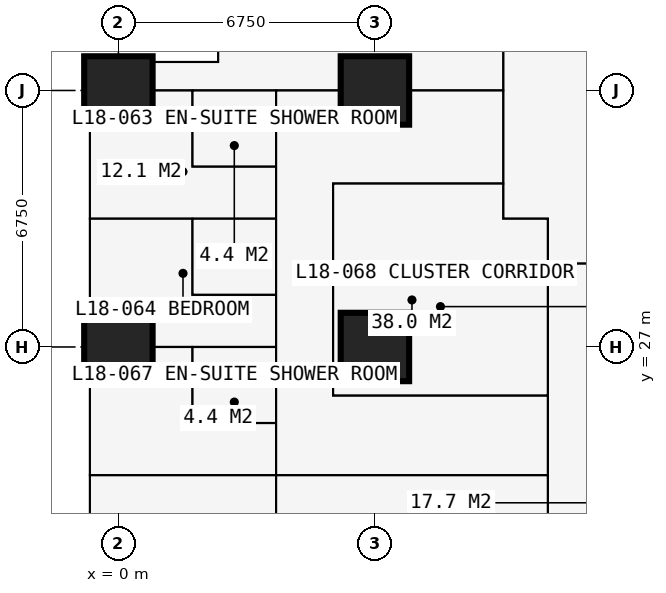
"""IFC4 building model, lengths in metres.
Left out: names, types, materials, properties, quantities, classifications, styles, units other than length and angle.
Written with IfcOpenShell. Run it as: python <this file> out.ifc"""

import sys

from ifc_helpers import new_model, si_unit, direction, frame, frame_2d, origin, origin_2d, place, context, subcontext, project, spatial, rectangle, extrude, element, fill, save


model = new_model("IFC4")
c1 = context("Model", 3, precision=1e-05, world=origin(), true_north=direction((0.0, 1.0)))
c2 = subcontext(c1, "Body", "Model", "MODEL_VIEW")
j1 = project(units=[si_unit("LENGTHUNIT", "METRE"), si_unit("PLANEANGLEUNIT", "RADIAN")], contexts=[c1])
p1 = place(None, origin())
s1 = spatial("IfcSite", under=j1, at=p1, CompositionType="ELEMENT")
p2 = place(p1, origin())
s2 = spatial("IfcBuilding", under=s1, at=p2, CompositionType="ELEMENT")
p3 = place(p2, frame((0.0, 0.0, 68.4)))
s3 = spatial("IfcBuildingStorey", under=s2, at=p3, CompositionType="ELEMENT", Elevation=68.4)
for number, where, z_axis, x_axis in (
    (1, (0.0, 27.0, 0.0), (0.0, 0.0, 1.0), (1.0, 0.0, 0.0)),
    (2, (0.0, 33.75, 0.0), (0.0, 0.0, 1.0), (1.0, 0.0, 0.0)),
    (3, (6.75, 27.0, 0.0), (0.0, 0.0, 1.0), (1.0, 0.0, 0.0)),
    (4, (6.75, 33.75, 0.0), (0.0, 0.0, 1.0), (1.0, 0.0, 0.0)),
):
    element("IfcColumn", number, at=place(p3, frame(where, z_axis=z_axis, x_axis=x_axis)), inside=s3, PredefinedType="COLUMN", context=c2, shape_type="SweptSolid", body=[
        extrude(rectangle(XDim=1.8, YDim=1.8, at=origin_2d()), origin(), (0.0, 0.0, 1.0), 3.6),
    ])
p4 = place(p3, frame((2.625, 37.875, 0.0), z_axis=(0.0, 0.0, 1.0), x_axis=(0.0, -1.0, 0.0)))
e5 = element("IfcWall", 5, at=p4, inside=s3, PredefinedType="SOLIDWALL", context=c2, shape_type="SweptSolid", body=[
    extrude(rectangle(XDim=3.375, YDim=0.3, at=frame_2d((1.688, 0.0))), origin(), (0.0, 0.0, 1.0), 3.375),
])
p5 = place(p4, frame((0.788, 0.0, 0.6)))
e6 = element("IfcOpeningElement", 6, at=p5, cuts=e5, PredefinedType="OPENING", context=c2, shape_type="SweptSolid", body=[
    extrude(rectangle(XDim=1.8, YDim=2.1, at=frame_2d((0.9, 1.05))), frame((0.0, 0.16, 0.0), z_axis=(0.0, -1.0, 0.0), x_axis=(1.0, 0.0, 0.0)), (0.0, 0.0, 1.0), 0.32),
])
p6 = place(p3, frame((2.625, 34.5, 0.0), z_axis=(0.0, 0.0, 1.0), x_axis=(-1.0, 0.0, 0.0)))
e7 = element("IfcWall", 7, at=p6, inside=s3, PredefinedType="SOLIDWALL", context=c2, shape_type="SweptSolid", body=[
    extrude(rectangle(XDim=3.375, YDim=0.3, at=frame_2d((1.688, 0.0))), origin(), (0.0, 0.0, 1.0), 3.375),
])
p7 = place(p6, frame((0.343, 0.0, 0.9)))
e8 = element("IfcOpeningElement", 8, at=p7, cuts=e7, PredefinedType="OPENING", context=c2, shape_type="SweptSolid", body=[
    extrude(rectangle(XDim=1.2, YDim=1.8, at=frame_2d((0.6, 0.9))), frame((0.0, 0.16, 0.0), z_axis=(0.0, -1.0, 0.0), x_axis=(1.0, 0.0, 0.0)), (0.0, 0.0, 1.0), 0.32),
])
p8 = place(p3, frame((-0.734, 23.625, 0.0), z_axis=(0.0, 0.0, 1.0), x_axis=(1.0, 0.0, 0.0)))
e9 = element("IfcWall", 9, at=p8, inside=s3, PredefinedType="PARTITIONING", context=c2, shape_type="SweptSolid", body=[
    extrude(rectangle(XDim=12.034, YDim=0.15, at=frame_2d((6.017, 0.0))), origin(), (0.0, 0.0, 1.0), 3.375),
])
p9 = place(p3, frame((-0.734, 27.0, 0.0), z_axis=(0.0, 0.0, 1.0), x_axis=(1.0, 0.0, 0.0)))
e10 = element("IfcWall", 10, at=p9, inside=s3, PredefinedType="PARTITIONING", context=c2, shape_type="SweptSolid", body=[
    extrude(rectangle(XDim=4.884, YDim=0.175, at=frame_2d((2.442, 0.0))), origin(), (0.0, 0.0, 1.0), 2.61),
])
p10 = place(p9, frame((3.334, 0.0, 0.0)))
e11 = element("IfcOpeningElement", 11, at=p10, cuts=e10, PredefinedType="OPENING", context=c2, shape_type="SweptSolid", body=[
    extrude(rectangle(XDim=0.9, YDim=2.2, at=frame_2d((0.45, 1.1))), frame((0.0, 0.097, 0.0), z_axis=(0.0, -1.0, 0.0), x_axis=(1.0, 0.0, 0.0)), (0.0, 0.0, 1.0), 0.195),
])
p11 = place(p3, frame((-0.734, 30.375, 0.0), z_axis=(0.0, 0.0, 1.0), x_axis=(1.0, 0.0, 0.0)))
e12 = element("IfcWall", 12, at=p11, inside=s3, PredefinedType="PARTITIONING", context=c2, shape_type="SweptSolid", body=[
    extrude(rectangle(XDim=4.884, YDim=0.175, at=frame_2d((2.442, 0.0))), origin(), (0.0, 0.0, 1.0), 3.375),
])
p12 = place(p11, frame((3.334, 0.0, 0.0)))
e13 = element("IfcOpeningElement", 13, at=p12, cuts=e12, PredefinedType="OPENING", context=c2, shape_type="SweptSolid", body=[
    extrude(rectangle(XDim=0.9, YDim=2.2, at=frame_2d((0.45, 1.1))), frame((0.0, 0.097, 0.0), z_axis=(0.0, -1.0, 0.0), x_axis=(1.0, 0.0, 0.0)), (0.0, 0.0, 1.0), 0.195),
])
p13 = place(p3, frame((-0.734, 33.75, 0.0), z_axis=(0.0, 0.0, 1.0), x_axis=(1.0, 0.0, 0.0)))
e14 = element("IfcWall", 14, at=p13, inside=s3, PredefinedType="PARTITIONING", context=c2, shape_type="SweptSolid", body=[
    extrude(rectangle(XDim=10.859, YDim=0.15, at=frame_2d((5.429, 0.0))), origin(), (0.0, 0.0, 1.0), 2.877),
])
p14 = place(p13, frame((8.434, 0.0, 0.0)))
e15 = element("IfcOpeningElement", 15, at=p14, cuts=e14, PredefinedType="OPENING", context=c2, shape_type="SweptSolid", body=[
    extrude(rectangle(XDim=1.0, YDim=2.2, at=frame_2d((0.5, 1.1))), frame((0.0, 0.085, 0.0), z_axis=(0.0, -1.0, 0.0), x_axis=(1.0, 0.0, 0.0)), (0.0, 0.0, 1.0), 0.17),
])
p15 = place(p3, frame((1.95, 25.0, 0.0), z_axis=(0.0, 0.0, 1.0), x_axis=(0.0, 1.0, 0.0)))
e16 = element("IfcWall", 16, at=p15, inside=s3, PredefinedType="PARTITIONING", context=c2, shape_type="SweptSolid", body=[
    extrude(rectangle(XDim=2.0, YDim=0.1, at=frame_2d((1.0, 0.0))), origin(), (0.0, 0.0, 1.0), 3.375),
])
p16 = place(p3, frame((1.95, 25.0, 0.0), z_axis=(0.0, 0.0, 1.0), x_axis=(1.0, 0.0, 0.0)))
e17 = element("IfcWall", 17, at=p16, inside=s3, PredefinedType="PARTITIONING", context=c2, shape_type="SweptSolid", body=[
    extrude(rectangle(XDim=2.2, YDim=0.1, at=frame_2d((1.1, 0.0))), origin(), (0.0, 0.0, 1.0), 3.375),
])
p17 = place(p3, frame((1.95, 28.375, 0.0), z_axis=(0.0, 0.0, 1.0), x_axis=(0.0, 1.0, 0.0)))
e18 = element("IfcWall", 18, at=p17, inside=s3, PredefinedType="PARTITIONING", context=c2, shape_type="SweptSolid", body=[
    extrude(rectangle(XDim=2.0, YDim=0.1, at=frame_2d((1.0, 0.0))), origin(), (0.0, 0.0, 1.0), 3.375),
])
p18 = place(p3, frame((1.95, 28.375, 0.0), z_axis=(0.0, 0.0, 1.0), x_axis=(1.0, 0.0, 0.0)))
e19 = element("IfcWall", 19, at=p18, inside=s3, PredefinedType="PARTITIONING", context=c2, shape_type="SweptSolid", body=[
    extrude(rectangle(XDim=2.2, YDim=0.1, at=frame_2d((1.1, 0.0))), origin(), (0.0, 0.0, 1.0), 3.375),
])
p19 = place(p3, frame((1.95, 31.75, 0.0), z_axis=(0.0, 0.0, 1.0), x_axis=(0.0, 1.0, 0.0)))
e20 = element("IfcWall", 20, at=p19, inside=s3, PredefinedType="PARTITIONING", context=c2, shape_type="SweptSolid", body=[
    extrude(rectangle(XDim=2.0, YDim=0.1, at=frame_2d((1.0, 0.0))), origin(), (0.0, 0.0, 1.0), 3.375),
])
p20 = place(p3, frame((1.95, 31.75, 0.0), z_axis=(0.0, 0.0, 1.0), x_axis=(1.0, 0.0, 0.0)))
e21 = element("IfcWall", 21, at=p20, inside=s3, PredefinedType="PARTITIONING", context=c2, shape_type="SweptSolid", body=[
    extrude(rectangle(XDim=2.2, YDim=0.1, at=frame_2d((1.1, 0.0))), origin(), (0.0, 0.0, 1.0), 3.375),
])
p21 = place(p20, frame((0.65, 0.0, 0.0)))
e22 = element("IfcOpeningElement", 22, at=p21, cuts=e21, PredefinedType="OPENING", context=c2, shape_type="SweptSolid", body=[
    extrude(rectangle(XDim=0.9, YDim=2.2, at=frame_2d((0.45, 1.1))), frame((0.0, 0.06, 0.0), z_axis=(0.0, -1.0, 0.0), x_axis=(1.0, 0.0, 0.0)), (0.0, 0.0, 1.0), 0.12),
])
p22 = place(p3, frame((4.15, 10.125, 0.0), z_axis=(0.0, 0.0, 1.0), x_axis=(0.0, 1.0, 0.0)))
e23 = element("IfcWall", 23, at=p22, inside=s3, PredefinedType="PARTITIONING", context=c2, shape_type="SweptSolid", body=[
    extrude(rectangle(XDim=23.625, YDim=0.15, at=frame_2d((11.812, 0.0))), origin(), (0.0, 0.0, 1.0), 3.375),
])
p23 = place(p22, frame((20.5, 0.0, 0.0)))
e24 = element("IfcOpeningElement", 24, at=p23, cuts=e23, PredefinedType="OPENING", context=c2, shape_type="SweptSolid", body=[
    extrude(rectangle(XDim=0.95, YDim=2.2, at=frame_2d((0.475, 1.1))), frame((0.0, 0.085, 0.0), z_axis=(0.0, -1.0, 0.0), x_axis=(1.0, 0.0, 0.0)), (0.0, 0.0, 1.0), 0.17),
])
p24 = place(p22, frame((17.125, 0.0, 0.0)))
e25 = element("IfcOpeningElement", 25, at=p24, cuts=e23, PredefinedType="OPENING", context=c2, shape_type="SweptSolid", body=[
    extrude(rectangle(XDim=0.95, YDim=2.2, at=frame_2d((0.475, 1.1))), frame((0.0, 0.085, 0.0), z_axis=(0.0, -1.0, 0.0), x_axis=(1.0, 0.0, 0.0)), (0.0, 0.0, 1.0), 0.17),
])
p25 = place(p22, frame((13.7, 0.0, 0.0)))
e26 = element("IfcOpeningElement", 26, at=p25, cuts=e23, PredefinedType="OPENING", context=c2, shape_type="SweptSolid", body=[
    extrude(rectangle(XDim=0.95, YDim=2.2, at=frame_2d((0.475, 1.1))), frame((0.0, 0.085, 0.0), z_axis=(0.0, -1.0, 0.0), x_axis=(1.0, 0.0, 0.0)), (0.0, 0.0, 1.0), 0.17),
])
p26 = place(p22, frame((4.2, 0.0, 0.0)))
e27 = element("IfcOpeningElement", 27, at=p26, cuts=e23, PredefinedType="OPENING", context=c2, shape_type="SweptSolid", body=[
    extrude(rectangle(XDim=0.95, YDim=2.2, at=frame_2d((0.475, 1.1))), frame((0.0, 0.085, 0.0), z_axis=(0.0, -1.0, 0.0), x_axis=(1.0, 0.0, 0.0)), (0.0, 0.0, 1.0), 0.17),
])
p27 = place(p22, frame((10.95, 0.0, 0.0)))
e28 = element("IfcOpeningElement", 28, at=p27, cuts=e23, PredefinedType="OPENING", context=c2, shape_type="SweptSolid", body=[
    extrude(rectangle(XDim=0.95, YDim=2.2, at=frame_2d((0.475, 1.1))), frame((0.0, 0.085, 0.0), z_axis=(0.0, -1.0, 0.0), x_axis=(1.0, 0.0, 0.0)), (0.0, 0.0, 1.0), 0.17),
])
p28 = place(p3, frame((5.65, 25.725, 0.0), z_axis=(0.0, 0.0, 1.0), x_axis=(0.0, 1.0, 0.0)))
e29 = element("IfcWall", 29, at=p28, inside=s3, PredefinedType="PARTITIONING", context=c2, shape_type="SweptSolid", body=[
    extrude(rectangle(XDim=5.575, YDim=0.15, at=frame_2d((2.788, 0.0))), origin(), (0.0, 0.0, 1.0), 3.375),
])
p29 = place(p3, frame((5.65, 25.725, 0.0), z_axis=(0.0, 0.0, 1.0), x_axis=(1.0, 0.0, 0.0)))
e30 = element("IfcWall", 30, at=p29, inside=s3, PredefinedType="PARTITIONING", context=c2, shape_type="SweptSolid", body=[
    extrude(rectangle(XDim=5.65, YDim=0.15, at=frame_2d((2.825, 0.0))), origin(), (0.0, 0.0, 1.0), 3.375),
])
p30 = place(p3, frame((5.65, 31.3, 0.0), z_axis=(0.0, 0.0, 1.0), x_axis=(1.0, 0.0, 0.0)))
e31 = element("IfcWall", 31, at=p30, inside=s3, PredefinedType="PARTITIONING", context=c2, shape_type="SweptSolid", body=[
    extrude(rectangle(XDim=4.475, YDim=0.15, at=frame_2d((2.238, 0.0))), origin(), (0.0, 0.0, 1.0), 3.375),
])
p31 = place(p3, frame((10.125, 30.375, 0.0), z_axis=(0.0, 0.0, 1.0), x_axis=(0.0, 1.0, 0.0)))
e32 = element("IfcWall", 32, at=p31, inside=s3, PredefinedType="PARTITIONING", context=c2, shape_type="SweptSolid", body=[
    extrude(rectangle(XDim=10.859, YDim=0.15, at=frame_2d((5.429, 0.0))), origin(), (0.0, 0.0, 1.0), 3.375),
])
p32 = place(p3, frame((10.125, 30.375, 0.0), z_axis=(0.0, 0.0, 1.0), x_axis=(1.0, 0.0, 0.0)))
e33 = element("IfcWall", 33, at=p32, inside=s3, PredefinedType="PARTITIONING", context=c2, shape_type="SweptSolid", body=[
    extrude(rectangle(XDim=1.175, YDim=0.15, at=frame_2d((0.587, 0.0))), origin(), (0.0, 0.0, 1.0), 3.375),
])
p33 = place(p3, frame((11.3, 11.3, 0.0), z_axis=(0.0, 0.0, 1.0), x_axis=(0.0, 1.0, 0.0)))
e34 = element("IfcWall", 34, at=p33, inside=s3, PredefinedType="PARTITIONING", context=c2, shape_type="SweptSolid", body=[
    extrude(rectangle(XDim=19.075, YDim=0.15, at=frame_2d((9.538, 0.0))), origin(), (0.0, 0.0, 1.0), 3.375),
])
p34 = place(p33, frame((12.875, 0.0, 0.0)))
e35 = element("IfcOpeningElement", 35, at=p34, cuts=e34, PredefinedType="OPENING", context=c2, shape_type="SweptSolid", body=[
    extrude(rectangle(XDim=1.0, YDim=2.2, at=frame_2d((0.5, 1.1))), frame((0.0, 0.085, 0.0), z_axis=(0.0, -1.0, 0.0), x_axis=(1.0, 0.0, 0.0)), (0.0, 0.0, 1.0), 0.17),
])
p35 = place(p33, frame((10.438, 0.0, 0.0)))
e36 = element("IfcOpeningElement", 36, at=p35, cuts=e34, PredefinedType="OPENING", context=c2, shape_type="SweptSolid", body=[
    extrude(rectangle(XDim=1.0, YDim=2.2, at=frame_2d((0.5, 1.1))), frame((0.0, 0.085, 0.0), z_axis=(0.0, -1.0, 0.0), x_axis=(1.0, 0.0, 0.0)), (0.0, 0.0, 1.0), 0.17),
])
p36 = place(p33, frame((15.675, 0.0, 0.0)))
e37 = element("IfcOpeningElement", 37, at=p36, cuts=e34, PredefinedType="OPENING", context=c2, shape_type="SweptSolid", body=[
    extrude(rectangle(XDim=0.95, YDim=2.2, at=frame_2d((0.475, 1.1))), frame((0.0, 0.085, 0.0), z_axis=(0.0, -1.0, 0.0), x_axis=(1.0, 0.0, 0.0)), (0.0, 0.0, 1.0), 0.17),
])
p37 = place(p3, frame((11.3, 29.2, 0.0), z_axis=(0.0, 0.0, 1.0), x_axis=(1.0, 0.0, 0.0)))
e38 = element("IfcWall", 38, at=p37, inside=s3, PredefinedType="PARTITIONING", context=c2, shape_type="SweptSolid", body=[
    extrude(rectangle(XDim=19.075, YDim=0.15, at=frame_2d((9.538, 0.0))), origin(), (0.0, 0.0, 1.0), 3.375),
])
p38 = place(p37, frame((12.875, 0.0, 0.0)))
e39 = element("IfcOpeningElement", 39, at=p38, cuts=e38, PredefinedType="OPENING", context=c2, shape_type="SweptSolid", body=[
    extrude(rectangle(XDim=1.0, YDim=2.2, at=frame_2d((0.5, 1.1))), frame((0.0, 0.085, 0.0), z_axis=(0.0, -1.0, 0.0), x_axis=(1.0, 0.0, 0.0)), (0.0, 0.0, 1.0), 0.17),
])
p39 = place(p37, frame((10.438, 0.0, 0.0)))
e40 = element("IfcOpeningElement", 40, at=p39, cuts=e38, PredefinedType="OPENING", context=c2, shape_type="SweptSolid", body=[
    extrude(rectangle(XDim=1.0, YDim=2.2, at=frame_2d((0.5, 1.1))), frame((0.0, 0.085, 0.0), z_axis=(0.0, -1.0, 0.0), x_axis=(1.0, 0.0, 0.0)), (0.0, 0.0, 1.0), 0.17),
])
p40 = place(p37, frame((14.875, 0.0, 0.0)))
e41 = element("IfcOpeningElement", 41, at=p40, cuts=e38, PredefinedType="OPENING", context=c2, shape_type="SweptSolid", body=[
    extrude(rectangle(XDim=0.95, YDim=2.2, at=frame_2d((0.475, 1.1))), frame((0.0, 0.085, 0.0), z_axis=(0.0, -1.0, 0.0), x_axis=(1.0, 0.0, 0.0)), (0.0, 0.0, 1.0), 0.17),
])
p41 = place(p7, origin())
e42 = element("IfcWindow", 42, at=p41, inside=s3, PartitioningType="SINGLE_PANEL", PredefinedType="WINDOW", context=c2, shape_type="SweptSolid", body=[
    extrude(rectangle(XDim=1.2, YDim=1.8, at=frame_2d((0.6, 0.9))), frame((0.0, 0.03, 0.0), z_axis=(0.0, -1.0, 0.0), x_axis=(1.0, 0.0, 0.0)), (0.0, 0.0, 1.0), 0.06),
])
fill(e8, e42)
p42 = place(p14, origin())
e43 = element("IfcDoor", 43, at=p42, inside=s3, OperationType="SINGLE_SWING_LEFT", PredefinedType="DOOR", context=c2, shape_type="SweptSolid", body=[
    extrude(rectangle(XDim=1.0, YDim=2.2, at=frame_2d((0.5, 1.1))), frame((0.0, 0.025, 0.0), z_axis=(0.0, -1.0, 0.0), x_axis=(1.0, 0.0, 0.0)), (0.0, 0.0, 1.0), 0.05),
])
fill(e15, e43)
p43 = place(p23, origin())
e44 = element("IfcDoor", 44, at=p43, inside=s3, OperationType="SINGLE_SWING_LEFT", PredefinedType="DOOR", context=c2, shape_type="SweptSolid", body=[
    extrude(rectangle(XDim=0.95, YDim=2.2, at=frame_2d((0.475, 1.1))), frame((0.0, 0.025, 0.0), z_axis=(0.0, -1.0, 0.0), x_axis=(1.0, 0.0, 0.0)), (0.0, 0.0, 1.0), 0.05),
])
fill(e24, e44)
p44 = place(p21, origin())
e45 = element("IfcDoor", 45, at=p44, inside=s3, OperationType="SINGLE_SWING_RIGHT", PredefinedType="DOOR", context=c2, shape_type="SweptSolid", body=[
    extrude(rectangle(XDim=0.9, YDim=2.2, at=frame_2d((0.45, 1.1))), frame((0.0, 0.025, 0.0), z_axis=(0.0, -1.0, 0.0), x_axis=(1.0, 0.0, 0.0)), (0.0, 0.0, 1.0), 0.05),
])
fill(e22, e45)
p45 = place(p24, origin())
e46 = element("IfcDoor", 46, at=p45, inside=s3, OperationType="SINGLE_SWING_LEFT", PredefinedType="DOOR", context=c2, shape_type="SweptSolid", body=[
    extrude(rectangle(XDim=0.95, YDim=2.2, at=frame_2d((0.475, 1.1))), frame((0.0, 0.025, 0.0), z_axis=(0.0, -1.0, 0.0), x_axis=(1.0, 0.0, 0.0)), (0.0, 0.0, 1.0), 0.05),
])
fill(e25, e46)
p46 = place(p12, origin())
e47 = element("IfcDoor", 47, at=p46, inside=s3, OperationType="SINGLE_SWING_RIGHT", PredefinedType="DOOR", context=c2, shape_type="SweptSolid", body=[
    extrude(rectangle(XDim=0.9, YDim=2.2, at=frame_2d((0.45, 1.1))), frame((0.0, 0.025, 0.0), z_axis=(0.0, -1.0, 0.0), x_axis=(1.0, 0.0, 0.0)), (0.0, 0.0, 1.0), 0.05),
])
fill(e13, e47)
p47 = place(p25, origin())
e48 = element("IfcDoor", 48, at=p47, inside=s3, OperationType="SINGLE_SWING_LEFT", PredefinedType="DOOR", context=c2, shape_type="SweptSolid", body=[
    extrude(rectangle(XDim=0.95, YDim=2.2, at=frame_2d((0.475, 1.1))), frame((0.0, 0.025, 0.0), z_axis=(0.0, -1.0, 0.0), x_axis=(1.0, 0.0, 0.0)), (0.0, 0.0, 1.0), 0.05),
])
fill(e26, e48)
p48 = place(p10, origin())
e49 = element("IfcDoor", 49, at=p48, inside=s3, OperationType="SINGLE_SWING_RIGHT", PredefinedType="DOOR", context=c2, shape_type="SweptSolid", body=[
    extrude(rectangle(XDim=0.9, YDim=2.2, at=frame_2d((0.45, 1.1))), frame((0.0, 0.025, 0.0), z_axis=(0.0, -1.0, 0.0), x_axis=(1.0, 0.0, 0.0)), (0.0, 0.0, 1.0), 0.05),
])
fill(e11, e49)
p49 = place(p34, origin())
e50 = element("IfcDoor", 50, at=p49, inside=s3, OperationType="SINGLE_SWING_LEFT", PredefinedType="DOOR", context=c2, shape_type="SweptSolid", body=[
    extrude(rectangle(XDim=1.0, YDim=2.2, at=frame_2d((0.5, 1.1))), frame((0.0, 0.025, 0.0), z_axis=(0.0, -1.0, 0.0), x_axis=(1.0, 0.0, 0.0)), (0.0, 0.0, 1.0), 0.05),
])
fill(e35, e50)
p50 = place(p35, origin())
e51 = element("IfcDoor", 51, at=p50, inside=s3, OperationType="SINGLE_SWING_LEFT", PredefinedType="DOOR", context=c2, shape_type="SweptSolid", body=[
    extrude(rectangle(XDim=1.0, YDim=2.2, at=frame_2d((0.5, 1.1))), frame((0.0, 0.025, 0.0), z_axis=(0.0, -1.0, 0.0), x_axis=(1.0, 0.0, 0.0)), (0.0, 0.0, 1.0), 0.05),
])
fill(e36, e51)
p51 = place(p36, origin())
e52 = element("IfcDoor", 52, at=p51, inside=s3, OperationType="SINGLE_SWING_LEFT", PredefinedType="DOOR", context=c2, shape_type="SweptSolid", body=[
    extrude(rectangle(XDim=0.95, YDim=2.2, at=frame_2d((0.475, 1.1))), frame((0.0, 0.025, 0.0), z_axis=(0.0, -1.0, 0.0), x_axis=(1.0, 0.0, 0.0)), (0.0, 0.0, 1.0), 0.05),
])
fill(e37, e52)
save(model, sys.argv[1])
